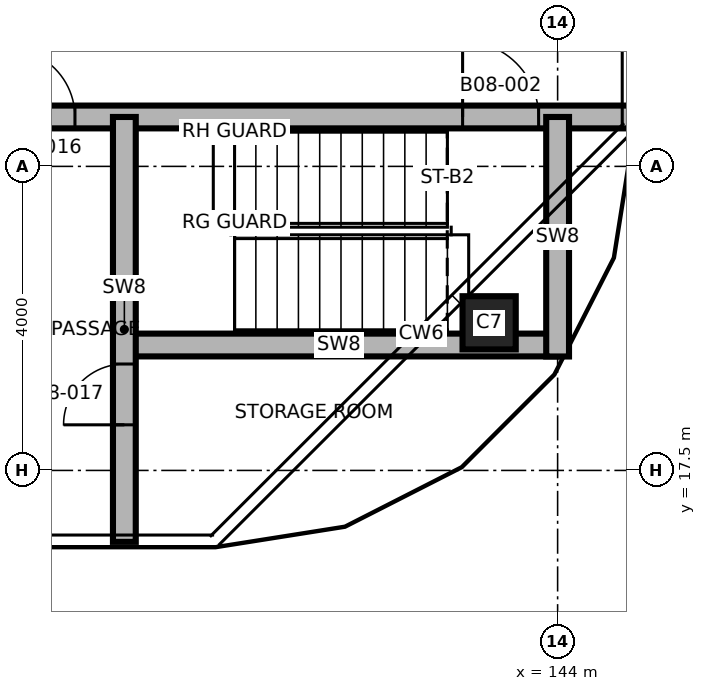
"""IFC4 building model, lengths in metres.
Left out: names, types, materials, properties, quantities, classifications, styles, units other than length and angle.
Written with IfcOpenShell. Run it as: python <this file> out.ifc"""

import sys

from ifc_helpers import new_model, si_unit, direction, frame, frame_2d, origin, origin_2d, place, context, subcontext, project, spatial, rectangle, extrude, element, fill, save


model = new_model("IFC4")
c1 = context("Model", 3, precision=1e-05, world=origin(), true_north=direction((0.0, 1.0)))
c2 = subcontext(c1, "Body", "Model", "MODEL_VIEW")
j1 = project(units=[si_unit("LENGTHUNIT", "METRE"), si_unit("PLANEANGLEUNIT", "RADIAN")], contexts=[c1])
p1 = place(None, origin())
s1 = spatial("IfcSite", under=j1, at=p1, CompositionType="ELEMENT")
p2 = place(p1, origin())
s2 = spatial("IfcBuilding", under=s1, at=p2, CompositionType="ELEMENT")
p3 = place(p2, frame((0.0, 0.0, 94.5)))
s3 = spatial("IfcBuildingStorey", under=s2, at=p3, CompositionType="ELEMENT", Elevation=94.5)
p4 = place(p3, frame((143.099, 19.442, 0.0), z_axis=(0.0, 0.0, 1.0), x_axis=(1.0, 0.0, 0.0)))
e1 = element("IfcColumn", 1, at=p4, inside=s3, PredefinedType="COLUMN", context=c2, shape_type="SweptSolid", body=[
    extrude(rectangle(XDim=0.7, YDim=0.7, at=origin_2d()), origin(), (0.0, 0.0, 1.0), 3.7),
])
p5 = place(p3, frame((138.25, 19.15, 0.0), z_axis=(0.0, 0.0, 1.0), x_axis=(1.0, 0.0, 0.0)))
e2 = element("IfcWall", 2, at=p5, inside=s3, PredefinedType="SHEAR", context=c2, shape_type="SweptSolid", body=[
    extrude(rectangle(XDim=5.75, YDim=0.3, at=frame_2d((2.875, 0.0))), origin(), (0.0, 0.0, 1.0), 3.4),
])
p6 = place(p3, frame((120.56, 22.15, 0.0), z_axis=(0.0, 0.0, 1.0), x_axis=(1.0, 0.0, 0.0)))
e3 = element("IfcWall", 3, at=p6, inside=s3, PredefinedType="SHEAR", context=c2, shape_type="SweptSolid", body=[
    extrude(rectangle(XDim=24.38, YDim=0.3, at=frame_2d((12.19, 0.0))), origin(), (0.0, 0.0, 1.0), 3.4),
])
p7 = place(p6, frame((22.19, 0.0, 0.0)))
e4 = element("IfcOpeningElement", 4, at=p7, cuts=e3, PredefinedType="OPENING", context=c2, shape_type="SweptSolid", body=[
    extrude(rectangle(XDim=1.0, YDim=2.1, at=frame_2d((0.5, 1.05))), frame((0.0, 0.16, 0.0), z_axis=(0.0, -1.0, 0.0), x_axis=(1.0, 0.0, 0.0)), (0.0, 0.0, 1.0), 0.32),
])
p8 = place(p6, frame((10.54, 0.0, 0.0)))
e5 = element("IfcOpeningElement", 5, at=p8, cuts=e3, PredefinedType="OPENING", context=c2, shape_type="SweptSolid", body=[
    extrude(rectangle(XDim=1.0, YDim=2.1, at=frame_2d((0.5, 1.05))), frame((0.0, 0.16, 0.0), z_axis=(0.0, -1.0, 0.0), x_axis=(1.0, 0.0, 0.0)), (0.0, 0.0, 1.0), 0.32),
])
p9 = place(p6, frame((16.19, 0.0, 0.0)))
e6 = element("IfcOpeningElement", 6, at=p9, cuts=e3, PredefinedType="OPENING", context=c2, shape_type="SweptSolid", body=[
    extrude(rectangle(XDim=0.9, YDim=2.1, at=frame_2d((0.45, 1.05))), frame((0.0, 0.16, 0.0), z_axis=(0.0, -1.0, 0.0), x_axis=(1.0, 0.0, 0.0)), (0.0, 0.0, 1.0), 0.32),
])
p10 = place(p3, frame((138.3, 16.56, 0.0), z_axis=(0.0, 0.0, 1.0), x_axis=(0.0, 1.0, 0.0)))
e7 = element("IfcWall", 7, at=p10, inside=s3, PredefinedType="SHEAR", context=c2, shape_type="SweptSolid", body=[
    extrude(rectangle(XDim=5.59, YDim=0.3, at=frame_2d((2.795, 0.0))), origin(), (0.0, 0.0, 1.0), 3.4),
])
p11 = place(p10, frame((1.54, 0.0, 0.0)))
e8 = element("IfcOpeningElement", 8, at=p11, cuts=e7, PredefinedType="OPENING", context=c2, shape_type="SweptSolid", body=[
    extrude(rectangle(XDim=0.8, YDim=2.1, at=frame_2d((0.4, 1.05))), frame((0.0, 0.16, 0.0), z_axis=(0.0, -1.0, 0.0), x_axis=(1.0, 0.0, 0.0)), (0.0, 0.0, 1.0), 0.32),
])
p12 = place(p3, frame((144.0, 18.999, 0.0), z_axis=(0.0, 0.0, 1.0), x_axis=(0.0, 1.0, 0.0)))
e9 = element("IfcWall", 9, at=p12, inside=s3, PredefinedType="SHEAR", context=c2, shape_type="SweptSolid", body=[
    extrude(rectangle(XDim=3.151, YDim=0.3, at=frame_2d((1.575, 0.0))), origin(), (0.0, 0.0, 1.0), 3.4),
])
p13 = place(p7, origin())
e10 = element("IfcDoor", 10, at=p13, inside=s3, OperationType="SINGLE_SWING_RIGHT", PredefinedType="DOOR", context=c2, shape_type="SweptSolid", body=[
    extrude(rectangle(XDim=1.0, YDim=2.1, at=frame_2d((0.5, 1.05))), frame((0.0, 0.025, 0.0), z_axis=(0.0, -1.0, 0.0), x_axis=(1.0, 0.0, 0.0)), (0.0, 0.0, 1.0), 0.05),
])
fill(e4, e10)
p14 = place(p9, origin())
e11 = element("IfcDoor", 11, at=p14, inside=s3, OperationType="SINGLE_SWING_RIGHT", PredefinedType="DOOR", context=c2, shape_type="SweptSolid", body=[
    extrude(rectangle(XDim=0.9, YDim=2.1, at=frame_2d((0.45, 1.05))), frame((0.0, 0.025, 0.0), z_axis=(0.0, -1.0, 0.0), x_axis=(1.0, 0.0, 0.0)), (0.0, 0.0, 1.0), 0.05),
])
fill(e6, e11)
p15 = place(p11, origin())
e12 = element("IfcDoor", 12, at=p15, inside=s3, OperationType="SINGLE_SWING_LEFT", PredefinedType="DOOR", context=c2, shape_type="SweptSolid", body=[
    extrude(rectangle(XDim=0.8, YDim=2.1, at=frame_2d((0.4, 1.05))), frame((0.0, 0.025, 0.0), z_axis=(0.0, -1.0, 0.0), x_axis=(1.0, 0.0, 0.0)), (0.0, 0.0, 1.0), 0.05),
])
fill(e8, e12)
save(model, sys.argv[1])
